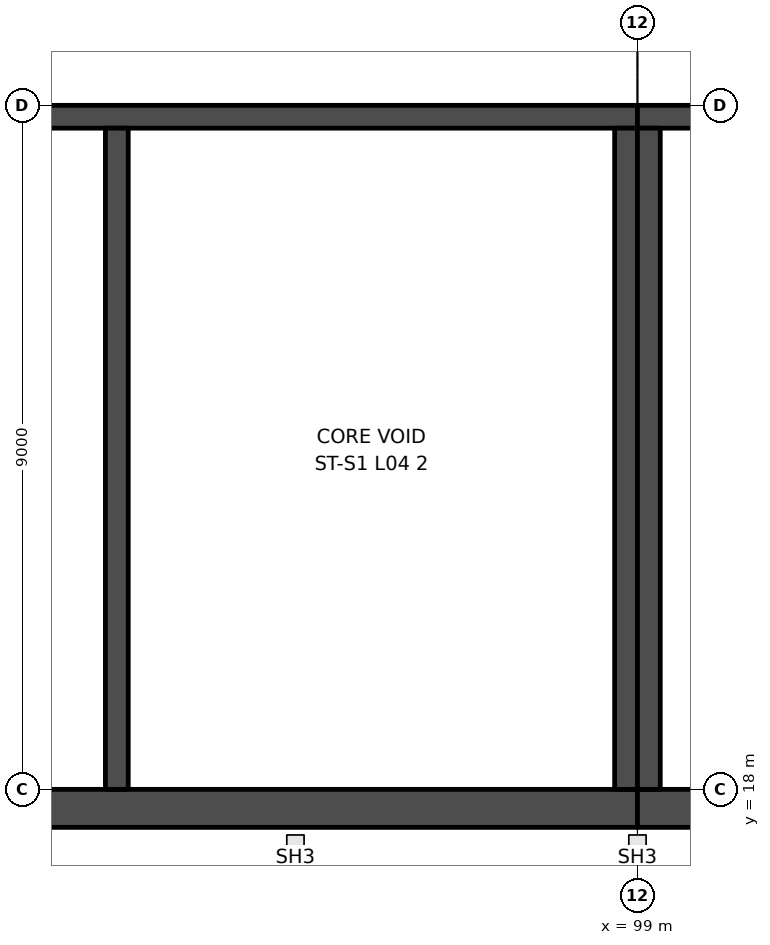
"""IFC4 building model, lengths in metres.
Left out: names, types, materials, properties, quantities, classifications, styles, units other than length and angle.
Written with IfcOpenShell. Run it as: python <this file> out.ifc"""

import sys

from ifc_helpers import new_model, si_unit, direction, frame, frame_2d, origin, place, context, subcontext, project, spatial, rectangle, extrude, element, save


model = new_model("IFC4")
c1 = context("Model", 3, precision=1e-05, world=origin(), true_north=direction((0.0, 1.0)))
c2 = subcontext(c1, "Body", "Model", "MODEL_VIEW")
j1 = project(units=[si_unit("LENGTHUNIT", "METRE"), si_unit("PLANEANGLEUNIT", "RADIAN")], contexts=[c1])
p1 = place(None, origin())
s1 = spatial("IfcSite", under=j1, at=p1, CompositionType="ELEMENT")
p2 = place(p1, origin())
s2 = spatial("IfcBuilding", under=s1, at=p2, CompositionType="ELEMENT")
p3 = place(p2, frame((0.0, 0.0, 28.0)))
s3 = spatial("IfcBuildingStorey", under=s2, at=p3, CompositionType="ELEMENT", Elevation=28.0)
p4 = place(p3, frame((81.0, 26.85, 0.0), z_axis=(0.0, 0.0, 1.0), x_axis=(1.0, 0.0, 0.0)))
e1 = element("IfcWall", 1, at=p4, inside=s3, PredefinedType="SHEAR", context=c2, shape_type="SweptSolid", body=[
    extrude(rectangle(XDim=18.0, YDim=0.3, at=frame_2d((9.0, 0.0))), origin(), (0.0, 0.0, 1.0), 5.5),
])
p5 = place(p4, frame((8.6, 0.0, 0.0)))
e2 = element("IfcOpeningElement", 2, at=p5, cuts=e1, PredefinedType="OPENING", context=c2, shape_type="SweptSolid", body=[
    extrude(rectangle(XDim=1.2, YDim=2.1, at=frame_2d((0.6, 1.05))), frame((0.0, 0.16, 0.0), z_axis=(0.0, -1.0, 0.0), x_axis=(1.0, 0.0, 0.0)), (0.0, 0.0, 1.0), 0.32),
])
p6 = place(p3, frame((81.0, 17.75, 0.0), z_axis=(0.0, 0.0, 1.0), x_axis=(1.0, 0.0, 0.0)))
e3 = element("IfcWall", 3, at=p6, inside=s3, PredefinedType="SHEAR", context=c2, shape_type="SweptSolid", body=[
    extrude(rectangle(XDim=18.0, YDim=0.5, at=frame_2d((9.0, 0.0))), origin(), (0.0, 0.0, 1.0), 5.5),
])
for number, where, z_axis, x_axis in (
    (4, (98.85, 26.7, 0.0), (0.0, 0.0, 1.0), (0.0, -1.0, 0.0)),
    (5, (92.15, 26.7, 0.0), (0.0, 0.0, 1.0), (0.0, -1.0, 0.0)),
):
    element("IfcWall", number, at=place(p3, frame(where, z_axis=z_axis, x_axis=x_axis)), inside=s3, PredefinedType="SHEAR", context=c2, shape_type="SweptSolid", body=[
        extrude(rectangle(XDim=8.7, YDim=0.3, at=frame_2d((4.35, 0.0))), origin(), (0.0, 0.0, 1.0), 5.5),
    ])
p7 = place(p3, frame((117.0, 26.85, 0.0), z_axis=(0.0, 0.0, 1.0), x_axis=(-1.0, 0.0, 0.0)))
e6 = element("IfcWall", 6, at=p7, inside=s3, PredefinedType="SHEAR", context=c2, shape_type="SweptSolid", body=[
    extrude(rectangle(XDim=18.0, YDim=0.3, at=frame_2d((9.0, 0.0))), origin(), (0.0, 0.0, 1.0), 5.5),
])
p8 = place(p7, frame((1.5, 0.0, 0.0)))
e7 = element("IfcOpeningElement", 7, at=p8, cuts=e6, PredefinedType="OPENING", context=c2, shape_type="SweptSolid", body=[
    extrude(rectangle(XDim=1.2, YDim=2.1, at=frame_2d((0.6, 1.05))), frame((0.0, 0.16, 0.0), z_axis=(0.0, -1.0, 0.0), x_axis=(1.0, 0.0, 0.0)), (0.0, 0.0, 1.0), 0.32),
])
p9 = place(p3, frame((117.0, 17.75, 0.0), z_axis=(0.0, 0.0, 1.0), x_axis=(-1.0, 0.0, 0.0)))
e8 = element("IfcWall", 8, at=p9, inside=s3, PredefinedType="SHEAR", context=c2, shape_type="SweptSolid", body=[
    extrude(rectangle(XDim=18.0, YDim=0.5, at=frame_2d((9.0, 0.0))), origin(), (0.0, 0.0, 1.0), 5.5),
])
p10 = place(p3, frame((99.15, 26.7, 0.0), z_axis=(0.0, 0.0, 1.0), x_axis=(0.0, -1.0, 0.0)))
e9 = element("IfcWall", 9, at=p10, inside=s3, PredefinedType="SHEAR", context=c2, shape_type="SweptSolid", body=[
    extrude(rectangle(XDim=8.7, YDim=0.3, at=frame_2d((4.35, 0.0))), origin(), (0.0, 0.0, 1.0), 5.5),
])
save(model, sys.argv[1])
